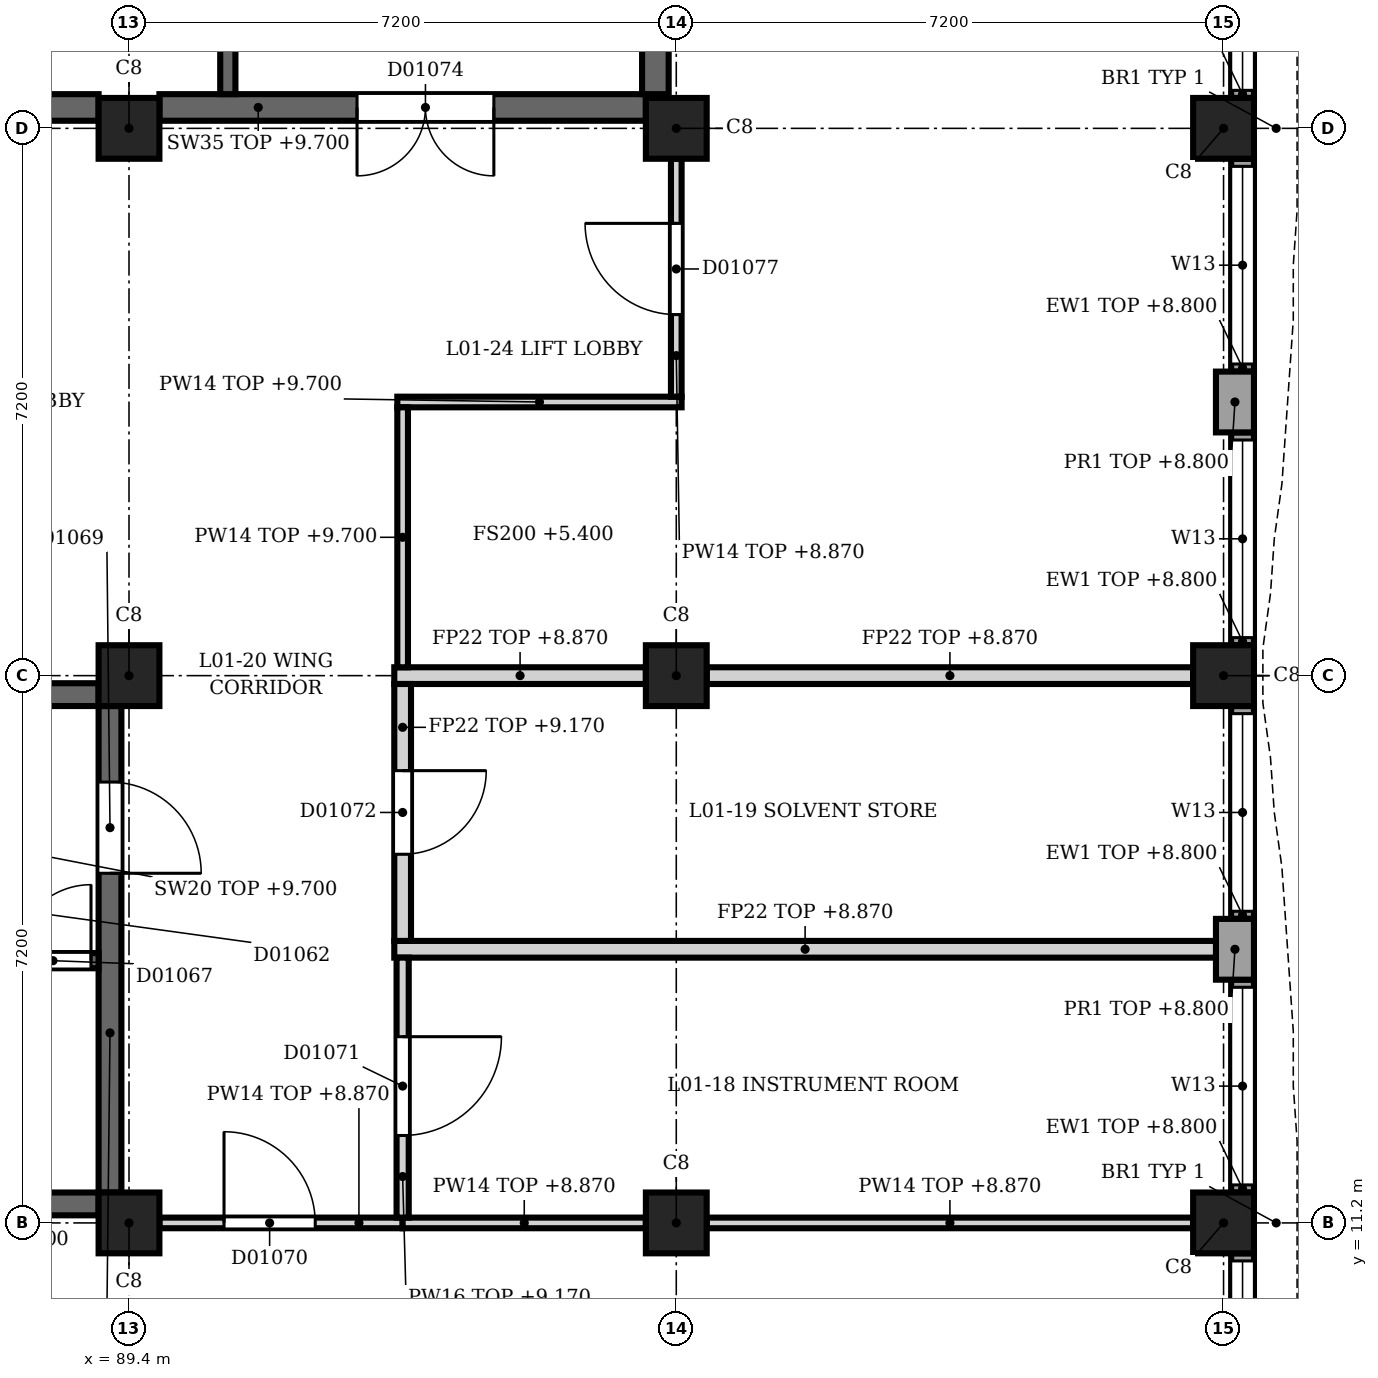
"""IFC4 building model, lengths in metres.
Left out: names, types, materials, properties, quantities, classifications, styles, units other than length and angle.
Written with IfcOpenShell. Run it as: python <this file> out.ifc"""

import sys

from ifc_helpers import new_model, si_unit, direction, frame, frame_2d, origin, origin_2d, place, context, subcontext, project, spatial, rectangle, extrude, element, fill, save


model = new_model("IFC4")
c1 = context("Model", 3, precision=1e-05, world=origin(), true_north=direction((0.0, 1.0)))
c2 = subcontext(c1, "Body", "Model", "MODEL_VIEW")
j1 = project(units=[si_unit("LENGTHUNIT", "METRE"), si_unit("PLANEANGLEUNIT", "RADIAN")], contexts=[c1])
p1 = place(None, origin())
s1 = spatial("IfcSite", under=j1, at=p1, CompositionType="ELEMENT")
p2 = place(p1, origin())
s2 = spatial("IfcBuilding", under=s1, at=p2, CompositionType="ELEMENT")
p3 = place(p2, frame((0.0, 0.0, 5.4)))
s3 = spatial("IfcBuildingStorey", under=s2, at=p3, CompositionType="ELEMENT", Elevation=5.4)
for number, where, z_axis, x_axis in (
    (1, (89.4, 11.2, 0.0), (0.0, 0.0, 1.0), (1.0, 0.0, 0.0)),
    (2, (89.4, 18.4, 0.0), (0.0, 0.0, 1.0), (1.0, 0.0, 0.0)),
    (3, (89.4, 25.6, 0.0), (0.0, 0.0, 1.0), (1.0, 0.0, 0.0)),
    (4, (96.6, 11.2, 0.0), (0.0, 0.0, 1.0), (1.0, 0.0, 0.0)),
    (5, (96.6, 18.4, 0.0), (0.0, 0.0, 1.0), (1.0, 0.0, 0.0)),
    (6, (96.6, 25.6, 0.0), (0.0, 0.0, 1.0), (1.0, 0.0, 0.0)),
    (7, (103.8, 11.2, 0.0), (0.0, 0.0, 1.0), (1.0, 0.0, 0.0)),
    (8, (103.8, 18.4, 0.0), (0.0, 0.0, 1.0), (1.0, 0.0, 0.0)),
    (9, (103.8, 25.6, 0.0), (0.0, 0.0, 1.0), (1.0, 0.0, 0.0)),
):
    element("IfcColumn", number, at=place(p3, frame(where, z_axis=z_axis, x_axis=x_axis)), inside=s3, PredefinedType="COLUMN", context=c2, shape_type="SweptSolid", body=[
        extrude(rectangle(XDim=0.8, YDim=0.8, at=origin_2d()), origin(), (0.0, 0.0, 1.0), 4.5),
    ])
p4 = place(p3, frame((103.95, 22.4, 0.0), z_axis=(0.0, 0.0, 1.0), x_axis=(0.0, -1.0, 0.0)))
e10 = element("IfcWall", 10, at=p4, inside=s3, PredefinedType="SOLIDWALL", context=c2, shape_type="SweptSolid", body=[
    extrude(rectangle(XDim=0.8, YDim=0.5, at=frame_2d((0.4, 0.0))), origin(), (0.0, 0.0, 1.0), 3.4),
])
p5 = place(p3, frame((103.95, 15.2, 0.0), z_axis=(0.0, 0.0, 1.0), x_axis=(0.0, -1.0, 0.0)))
e11 = element("IfcWall", 11, at=p5, inside=s3, PredefinedType="SOLIDWALL", context=c2, shape_type="SweptSolid", body=[
    extrude(rectangle(XDim=0.8, YDim=0.5, at=frame_2d((0.4, 0.0))), origin(), (0.0, 0.0, 1.0), 3.4),
])
p6 = place(p3, frame((104.05, 28.8, 0.0), z_axis=(0.0, 0.0, 1.0), x_axis=(0.0, -1.0, 0.0)))
e12 = element("IfcWall", 12, at=p6, inside=s3, PredefinedType="SOLIDWALL", context=c2, shape_type="SweptSolid", body=[
    extrude(rectangle(XDim=2.8, YDim=0.3, at=frame_2d((1.4, 0.0))), origin(), (0.0, 0.0, 1.0), 3.4),
])
p7 = place(p6, frame((0.1, 0.0, 0.9)))
e13 = element("IfcOpeningElement", 13, at=p7, cuts=e12, PredefinedType="OPENING", context=c2, shape_type="SweptSolid", body=[
    extrude(rectangle(XDim=2.6, YDim=2.2, at=frame_2d((1.3, 1.1))), frame((0.0, 0.16, 0.0), z_axis=(0.0, -1.0, 0.0), x_axis=(1.0, 0.0, 0.0)), (0.0, 0.0, 1.0), 0.32),
])
p8 = place(p3, frame((104.05, 25.2, 0.0), z_axis=(0.0, 0.0, 1.0), x_axis=(0.0, -1.0, 0.0)))
e14 = element("IfcWall", 14, at=p8, inside=s3, PredefinedType="SOLIDWALL", context=c2, shape_type="SweptSolid", body=[
    extrude(rectangle(XDim=2.8, YDim=0.3, at=frame_2d((1.4, 0.0))), origin(), (0.0, 0.0, 1.0), 3.4),
])
p9 = place(p8, frame((0.1, 0.0, 0.9)))
e15 = element("IfcOpeningElement", 15, at=p9, cuts=e14, PredefinedType="OPENING", context=c2, shape_type="SweptSolid", body=[
    extrude(rectangle(XDim=2.6, YDim=2.2, at=frame_2d((1.3, 1.1))), frame((0.0, 0.16, 0.0), z_axis=(0.0, -1.0, 0.0), x_axis=(1.0, 0.0, 0.0)), (0.0, 0.0, 1.0), 0.32),
])
p10 = place(p3, frame((104.05, 21.6, 0.0), z_axis=(0.0, 0.0, 1.0), x_axis=(0.0, -1.0, 0.0)))
e16 = element("IfcWall", 16, at=p10, inside=s3, PredefinedType="SOLIDWALL", context=c2, shape_type="SweptSolid", body=[
    extrude(rectangle(XDim=2.8, YDim=0.3, at=frame_2d((1.4, 0.0))), origin(), (0.0, 0.0, 1.0), 3.4),
])
p11 = place(p10, frame((0.1, 0.0, 0.9)))
e17 = element("IfcOpeningElement", 17, at=p11, cuts=e16, PredefinedType="OPENING", context=c2, shape_type="SweptSolid", body=[
    extrude(rectangle(XDim=2.6, YDim=2.2, at=frame_2d((1.3, 1.1))), frame((0.0, 0.16, 0.0), z_axis=(0.0, -1.0, 0.0), x_axis=(1.0, 0.0, 0.0)), (0.0, 0.0, 1.0), 0.32),
])
p12 = place(p3, frame((104.05, 18.0, 0.0), z_axis=(0.0, 0.0, 1.0), x_axis=(0.0, -1.0, 0.0)))
e18 = element("IfcWall", 18, at=p12, inside=s3, PredefinedType="SOLIDWALL", context=c2, shape_type="SweptSolid", body=[
    extrude(rectangle(XDim=2.8, YDim=0.3, at=frame_2d((1.4, 0.0))), origin(), (0.0, 0.0, 1.0), 3.4),
])
p13 = place(p12, frame((0.1, 0.0, 0.9)))
e19 = element("IfcOpeningElement", 19, at=p13, cuts=e18, PredefinedType="OPENING", context=c2, shape_type="SweptSolid", body=[
    extrude(rectangle(XDim=2.6, YDim=2.2, at=frame_2d((1.3, 1.1))), frame((0.0, 0.16, 0.0), z_axis=(0.0, -1.0, 0.0), x_axis=(1.0, 0.0, 0.0)), (0.0, 0.0, 1.0), 0.32),
])
p14 = place(p3, frame((104.05, 14.4, 0.0), z_axis=(0.0, 0.0, 1.0), x_axis=(0.0, -1.0, 0.0)))
e20 = element("IfcWall", 20, at=p14, inside=s3, PredefinedType="SOLIDWALL", context=c2, shape_type="SweptSolid", body=[
    extrude(rectangle(XDim=2.8, YDim=0.3, at=frame_2d((1.4, 0.0))), origin(), (0.0, 0.0, 1.0), 3.4),
])
p15 = place(p14, frame((0.1, 0.0, 0.9)))
e21 = element("IfcOpeningElement", 21, at=p15, cuts=e20, PredefinedType="OPENING", context=c2, shape_type="SweptSolid", body=[
    extrude(rectangle(XDim=2.6, YDim=2.2, at=frame_2d((1.3, 1.1))), frame((0.0, 0.16, 0.0), z_axis=(0.0, -1.0, 0.0), x_axis=(1.0, 0.0, 0.0)), (0.0, 0.0, 1.0), 0.32),
])
p16 = place(p3, frame((104.05, 10.8, 0.0), z_axis=(0.0, 0.0, 1.0), x_axis=(0.0, -1.0, 0.0)))
e22 = element("IfcWall", 22, at=p16, inside=s3, PredefinedType="SOLIDWALL", context=c2, shape_type="SweptSolid", body=[
    extrude(rectangle(XDim=2.8, YDim=0.3, at=frame_2d((1.4, 0.0))), origin(), (0.0, 0.0, 1.0), 3.4),
])
p17 = place(p16, frame((0.1, 0.0, 0.9)))
e23 = element("IfcOpeningElement", 23, at=p17, cuts=e22, PredefinedType="OPENING", context=c2, shape_type="SweptSolid", body=[
    extrude(rectangle(XDim=2.6, YDim=2.2, at=frame_2d((1.3, 1.1))), frame((0.0, 0.16, 0.0), z_axis=(0.0, -1.0, 0.0), x_axis=(1.0, 0.0, 0.0)), (0.0, 0.0, 1.0), 0.32),
])
p18 = place(p3, frame((82.6, 25.875, 0.0), z_axis=(0.0, 0.0, 1.0), x_axis=(1.0, 0.0, 0.0)))
e24 = element("IfcWall", 24, at=p18, inside=s3, PredefinedType="SHEAR", context=c2, shape_type="SweptSolid", body=[
    extrude(rectangle(XDim=6.4, YDim=0.35, at=frame_2d((3.2, 0.0))), origin(), (0.0, 0.0, 1.0), 4.3),
])
p19 = place(p18, frame((3.8, 0.0, 0.0)))
e25 = element("IfcOpeningElement", 25, at=p19, cuts=e24, PredefinedType="OPENING", context=c2, shape_type="SweptSolid", body=[
    extrude(rectangle(XDim=1.2, YDim=2.1, at=frame_2d((0.6, 1.05))), frame((0.0, 0.185, 0.0), z_axis=(0.0, -1.0, 0.0), x_axis=(1.0, 0.0, 0.0)), (0.0, 0.0, 1.0), 0.37),
])
p20 = place(p3, frame((89.8, 25.875, 0.0), z_axis=(0.0, 0.0, 1.0), x_axis=(1.0, 0.0, 0.0)))
e26 = element("IfcWall", 26, at=p20, inside=s3, PredefinedType="SHEAR", context=c2, shape_type="SweptSolid", body=[
    extrude(rectangle(XDim=6.4, YDim=0.35, at=frame_2d((3.2, 0.0))), origin(), (0.0, 0.0, 1.0), 4.3),
])
p21 = place(p20, frame((2.6, 0.0, 0.0)))
e27 = element("IfcOpeningElement", 27, at=p21, cuts=e26, PredefinedType="OPENING", context=c2, shape_type="SweptSolid", body=[
    extrude(rectangle(XDim=1.8, YDim=2.1, at=frame_2d((0.9, 1.05))), frame((0.0, 0.185, 0.0), z_axis=(0.0, -1.0, 0.0), x_axis=(1.0, 0.0, 0.0)), (0.0, 0.0, 1.0), 0.37),
])
p22 = place(p3, frame((96.325, 26.05, 0.0), z_axis=(0.0, 0.0, 1.0), x_axis=(0.0, 1.0, 0.0)))
e28 = element("IfcWall", 28, at=p22, inside=s3, PredefinedType="SHEAR", context=c2, shape_type="SweptSolid", body=[
    extrude(rectangle(XDim=6.3, YDim=0.35, at=frame_2d((3.15, 0.0))), origin(), (0.0, 0.0, 1.0), 4.3),
])
p23 = place(p3, frame((90.7, 26.05, 0.0), z_axis=(0.0, 0.0, 1.0), x_axis=(0.0, 1.0, 0.0)))
e29 = element("IfcWall", 29, at=p23, inside=s3, PredefinedType="SHEAR", context=c2, shape_type="SweptSolid", body=[
    extrude(rectangle(XDim=3.05, YDim=0.2, at=frame_2d((1.525, 0.0))), origin(), (0.0, 0.0, 1.0), 4.3),
])
p24 = place(p3, frame((89.15, 11.6, 0.0), z_axis=(0.0, 0.0, 1.0), x_axis=(0.0, 1.0, 0.0)))
e30 = element("IfcWall", 30, at=p24, inside=s3, PredefinedType="SHEAR", context=c2, shape_type="SweptSolid", body=[
    extrude(rectangle(XDim=6.4, YDim=0.3, at=frame_2d((3.2, 0.0))), origin(), (0.0, 0.0, 1.0), 4.3),
])
p25 = place(p24, frame((4.2, 0.0, 0.0)))
e31 = element("IfcOpeningElement", 31, at=p25, cuts=e30, PredefinedType="OPENING", context=c2, shape_type="SweptSolid", body=[
    extrude(rectangle(XDim=1.2, YDim=2.1, at=frame_2d((0.6, 1.05))), frame((0.0, 0.16, 0.0), z_axis=(0.0, -1.0, 0.0), x_axis=(1.0, 0.0, 0.0)), (0.0, 0.0, 1.0), 0.32),
])
for number, where, z_axis, x_axis in (
    (32, (82.6, 11.45, 0.0), (0.0, 0.0, 1.0), (1.0, 0.0, 0.0)),
    (33, (82.6, 18.15, 0.0), (0.0, 0.0, 1.0), (1.0, 0.0, 0.0)),
):
    element("IfcWall", number, at=place(p3, frame(where, z_axis=z_axis, x_axis=x_axis)), inside=s3, PredefinedType="SHEAR", context=c2, shape_type="SweptSolid", body=[
        extrude(rectangle(XDim=6.4, YDim=0.3, at=frame_2d((3.2, 0.0))), origin(), (0.0, 0.0, 1.0), 4.3),
    ])
p26 = place(p3, frame((89.0, 14.65, 0.0), z_axis=(0.0, 0.0, 1.0), x_axis=(-1.0, 0.0, 0.0)))
e34 = element("IfcWall", 34, at=p26, inside=s3, PredefinedType="SHEAR", context=c2, shape_type="SweptSolid", body=[
    extrude(rectangle(XDim=6.4, YDim=0.2, at=frame_2d((3.2, 0.0))), origin(), (0.0, 0.0, 1.0), 4.3),
])
p27 = place(p26, frame((0.1, 0.0, 0.0)))
e35 = element("IfcOpeningElement", 35, at=p27, cuts=e34, PredefinedType="OPENING", context=c2, shape_type="SweptSolid", body=[
    extrude(rectangle(XDim=1.0, YDim=2.1, at=frame_2d((0.5, 1.05))), frame((0.0, 0.11, 0.0), z_axis=(0.0, -1.0, 0.0), x_axis=(1.0, 0.0, 0.0)), (0.0, 0.0, 1.0), 0.22),
])
p28 = place(p3, frame((93.0, 11.2, 0.0), z_axis=(0.0, 0.0, 1.0), x_axis=(-1.0, 0.0, 0.0)))
e36 = element("IfcWall", 36, at=p28, inside=s3, PredefinedType="PARTITIONING", context=c2, shape_type="SweptSolid", body=[
    extrude(rectangle(XDim=3.2, YDim=0.14, at=frame_2d((1.6, 0.0))), origin(), (0.0, 0.0, 1.0), 3.47),
])
p29 = place(p28, frame((1.15, 0.0, 0.0)))
e37 = element("IfcOpeningElement", 37, at=p29, cuts=e36, PredefinedType="OPENING", context=c2, shape_type="SweptSolid", body=[
    extrude(rectangle(XDim=1.2, YDim=2.1, at=frame_2d((0.6, 1.05))), frame((0.0, 0.08, 0.0), z_axis=(0.0, -1.0, 0.0), x_axis=(1.0, 0.0, 0.0)), (0.0, 0.0, 1.0), 0.16),
])
p30 = place(p3, frame((93.0, 11.2, 0.0), z_axis=(0.0, 0.0, 1.0), x_axis=(1.0, 0.0, 0.0)))
e38 = element("IfcWall", 38, at=p30, inside=s3, PredefinedType="PARTITIONING", context=c2, shape_type="SweptSolid", body=[
    extrude(rectangle(XDim=3.2, YDim=0.14, at=frame_2d((1.6, 0.0))), origin(), (0.0, 0.0, 1.0), 3.47),
])
p31 = place(p3, frame((97.0, 11.2, 0.0), z_axis=(0.0, 0.0, 1.0), x_axis=(1.0, 0.0, 0.0)))
e39 = element("IfcWall", 39, at=p31, inside=s3, PredefinedType="PARTITIONING", context=c2, shape_type="SweptSolid", body=[
    extrude(rectangle(XDim=6.4, YDim=0.14, at=frame_2d((3.2, 0.0))), origin(), (0.0, 0.0, 1.0), 3.47),
])
p32 = place(p3, frame((92.89, 14.8, 0.0), z_axis=(0.0, 0.0, 1.0), x_axis=(1.0, 0.0, 0.0)))
e40 = element("IfcWall", 40, at=p32, inside=s3, PredefinedType="PARTITIONING", context=c2, shape_type="SweptSolid", body=[
    extrude(rectangle(XDim=10.81, YDim=0.22, at=frame_2d((5.405, 0.0))), origin(), (0.0, 0.0, 1.0), 3.47),
])
p33 = place(p3, frame((92.89, 18.4, 0.0), z_axis=(0.0, 0.0, 1.0), x_axis=(1.0, 0.0, 0.0)))
e41 = element("IfcWall", 41, at=p33, inside=s3, PredefinedType="PARTITIONING", context=c2, shape_type="SweptSolid", body=[
    extrude(rectangle(XDim=3.31, YDim=0.22, at=frame_2d((1.655, 0.0))), origin(), (0.0, 0.0, 1.0), 3.47),
])
p34 = place(p3, frame((97.0, 18.4, 0.0), z_axis=(0.0, 0.0, 1.0), x_axis=(1.0, 0.0, 0.0)))
e42 = element("IfcWall", 42, at=p34, inside=s3, PredefinedType="PARTITIONING", context=c2, shape_type="SweptSolid", body=[
    extrude(rectangle(XDim=6.4, YDim=0.22, at=frame_2d((3.2, 0.0))), origin(), (0.0, 0.0, 1.0), 3.47),
])
p35 = place(p3, frame((92.93, 22.0, 0.0), z_axis=(0.0, 0.0, 1.0), x_axis=(1.0, 0.0, 0.0)))
e43 = element("IfcWall", 43, at=p35, inside=s3, PredefinedType="PARTITIONING", context=c2, shape_type="SweptSolid", body=[
    extrude(rectangle(XDim=3.74, YDim=0.14, at=frame_2d((1.87, 0.0))), origin(), (0.0, 0.0, 1.0), 4.3),
])
p36 = place(p3, frame((93.0, 14.69, 0.0), z_axis=(0.0, 0.0, 1.0), x_axis=(0.0, -1.0, 0.0)))
e44 = element("IfcWall", 44, at=p36, inside=s3, PredefinedType="PARTITIONING", context=c2, shape_type="SweptSolid", body=[
    extrude(rectangle(XDim=3.42, YDim=0.16, at=frame_2d((1.71, 0.0))), origin(), (0.0, 0.0, 1.0), 3.77),
])
p37 = place(p36, frame((1.04, 0.0, 0.0)))
e45 = element("IfcOpeningElement", 45, at=p37, cuts=e44, PredefinedType="OPENING", context=c2, shape_type="SweptSolid", body=[
    extrude(rectangle(XDim=1.3, YDim=2.2, at=frame_2d((0.65, 1.1))), frame((0.0, 0.09, 0.0), z_axis=(0.0, -1.0, 0.0), x_axis=(1.0, 0.0, 0.0)), (0.0, 0.0, 1.0), 0.18),
])
p38 = place(p3, frame((93.0, 18.29, 0.0), z_axis=(0.0, 0.0, 1.0), x_axis=(0.0, -1.0, 0.0)))
e46 = element("IfcWall", 46, at=p38, inside=s3, PredefinedType="PARTITIONING", context=c2, shape_type="SweptSolid", body=[
    extrude(rectangle(XDim=3.38, YDim=0.22, at=frame_2d((1.69, 0.0))), origin(), (0.0, 0.0, 1.0), 3.77),
])
p39 = place(p38, frame((1.14, 0.0, 0.0)))
e47 = element("IfcOpeningElement", 47, at=p39, cuts=e46, PredefinedType="OPENING", context=c2, shape_type="SweptSolid", body=[
    extrude(rectangle(XDim=1.1, YDim=2.3, at=frame_2d((0.55, 1.15))), frame((0.0, 0.12, 0.0), z_axis=(0.0, -1.0, 0.0), x_axis=(1.0, 0.0, 0.0)), (0.0, 0.0, 1.0), 0.24),
])
p40 = place(p3, frame((93.0, 18.51, 0.0), z_axis=(0.0, 0.0, 1.0), x_axis=(0.0, 1.0, 0.0)))
e48 = element("IfcWall", 48, at=p40, inside=s3, PredefinedType="PARTITIONING", context=c2, shape_type="SweptSolid", body=[
    extrude(rectangle(XDim=3.42, YDim=0.14, at=frame_2d((1.71, 0.0))), origin(), (0.0, 0.0, 1.0), 4.3),
])
p41 = place(p3, frame((96.6, 25.2, 0.0), z_axis=(0.0, 0.0, 1.0), x_axis=(0.0, -1.0, 0.0)))
e49 = element("IfcWall", 49, at=p41, inside=s3, PredefinedType="PARTITIONING", context=c2, shape_type="SweptSolid", body=[
    extrude(rectangle(XDim=3.13, YDim=0.14, at=frame_2d((1.565, 0.0))), origin(), (0.0, 0.0, 1.0), 3.47),
])
p42 = place(p41, frame((0.85, 0.0, 0.0)))
e50 = element("IfcOpeningElement", 50, at=p42, cuts=e49, PredefinedType="OPENING", context=c2, shape_type="SweptSolid", body=[
    extrude(rectangle(XDim=1.2, YDim=2.1, at=frame_2d((0.6, 1.05))), frame((0.0, 0.08, 0.0), z_axis=(0.0, -1.0, 0.0), x_axis=(1.0, 0.0, 0.0)), (0.0, 0.0, 1.0), 0.16),
])
p43 = place(p7, origin())
e51 = element("IfcWindow", 51, at=p43, inside=s3, PartitioningType="SINGLE_PANEL", PredefinedType="WINDOW", context=c2, shape_type="SweptSolid", body=[
    extrude(rectangle(XDim=2.6, YDim=2.2, at=frame_2d((1.3, 1.1))), frame((0.0, 0.03, 0.0), z_axis=(0.0, -1.0, 0.0), x_axis=(1.0, 0.0, 0.0)), (0.0, 0.0, 1.0), 0.06),
])
fill(e13, e51)
p44 = place(p9, origin())
e52 = element("IfcWindow", 52, at=p44, inside=s3, PartitioningType="SINGLE_PANEL", PredefinedType="WINDOW", context=c2, shape_type="SweptSolid", body=[
    extrude(rectangle(XDim=2.6, YDim=2.2, at=frame_2d((1.3, 1.1))), frame((0.0, 0.03, 0.0), z_axis=(0.0, -1.0, 0.0), x_axis=(1.0, 0.0, 0.0)), (0.0, 0.0, 1.0), 0.06),
])
fill(e15, e52)
p45 = place(p11, origin())
e53 = element("IfcWindow", 53, at=p45, inside=s3, PartitioningType="SINGLE_PANEL", PredefinedType="WINDOW", context=c2, shape_type="SweptSolid", body=[
    extrude(rectangle(XDim=2.6, YDim=2.2, at=frame_2d((1.3, 1.1))), frame((0.0, 0.03, 0.0), z_axis=(0.0, -1.0, 0.0), x_axis=(1.0, 0.0, 0.0)), (0.0, 0.0, 1.0), 0.06),
])
fill(e17, e53)
p46 = place(p13, origin())
e54 = element("IfcWindow", 54, at=p46, inside=s3, PartitioningType="SINGLE_PANEL", PredefinedType="WINDOW", context=c2, shape_type="SweptSolid", body=[
    extrude(rectangle(XDim=2.6, YDim=2.2, at=frame_2d((1.3, 1.1))), frame((0.0, 0.03, 0.0), z_axis=(0.0, -1.0, 0.0), x_axis=(1.0, 0.0, 0.0)), (0.0, 0.0, 1.0), 0.06),
])
fill(e19, e54)
p47 = place(p15, origin())
e55 = element("IfcWindow", 55, at=p47, inside=s3, PartitioningType="SINGLE_PANEL", PredefinedType="WINDOW", context=c2, shape_type="SweptSolid", body=[
    extrude(rectangle(XDim=2.6, YDim=2.2, at=frame_2d((1.3, 1.1))), frame((0.0, 0.03, 0.0), z_axis=(0.0, -1.0, 0.0), x_axis=(1.0, 0.0, 0.0)), (0.0, 0.0, 1.0), 0.06),
])
fill(e21, e55)
p48 = place(p17, origin())
e56 = element("IfcWindow", 56, at=p48, inside=s3, PartitioningType="SINGLE_PANEL", PredefinedType="WINDOW", context=c2, shape_type="SweptSolid", body=[
    extrude(rectangle(XDim=2.6, YDim=2.2, at=frame_2d((1.3, 1.1))), frame((0.0, 0.03, 0.0), z_axis=(0.0, -1.0, 0.0), x_axis=(1.0, 0.0, 0.0)), (0.0, 0.0, 1.0), 0.06),
])
fill(e23, e56)
p49 = place(p21, origin())
e57 = element("IfcDoor", 57, at=p49, inside=s3, OperationType="SINGLE_SWING_LEFT", PredefinedType="DOOR", context=c2, shape_type="SweptSolid", body=[
    extrude(rectangle(XDim=1.8, YDim=2.1, at=frame_2d((0.9, 1.05))), frame((0.0, 0.025, 0.0), z_axis=(0.0, -1.0, 0.0), x_axis=(1.0, 0.0, 0.0)), (0.0, 0.0, 1.0), 0.05),
])
fill(e27, e57)
p50 = place(p25, origin())
e58 = element("IfcDoor", 58, at=p50, inside=s3, OperationType="SINGLE_SWING_RIGHT", PredefinedType="DOOR", context=c2, shape_type="SweptSolid", body=[
    extrude(rectangle(XDim=1.2, YDim=2.1, at=frame_2d((0.6, 1.05))), frame((0.0, 0.025, 0.0), z_axis=(0.0, -1.0, 0.0), x_axis=(1.0, 0.0, 0.0)), (0.0, 0.0, 1.0), 0.05),
])
fill(e31, e58)
p51 = place(p27, origin())
e59 = element("IfcDoor", 59, at=p51, inside=s3, OperationType="SINGLE_SWING_LEFT", PredefinedType="DOOR", context=c2, shape_type="SweptSolid", body=[
    extrude(rectangle(XDim=1.0, YDim=2.1, at=frame_2d((0.5, 1.05))), frame((0.0, 0.025, 0.0), z_axis=(0.0, -1.0, 0.0), x_axis=(1.0, 0.0, 0.0)), (0.0, 0.0, 1.0), 0.05),
])
fill(e35, e59)
p52 = place(p29, origin())
e60 = element("IfcDoor", 60, at=p52, inside=s3, OperationType="SINGLE_SWING_RIGHT", PredefinedType="DOOR", context=c2, shape_type="SweptSolid", body=[
    extrude(rectangle(XDim=1.2, YDim=2.1, at=frame_2d((0.6, 1.05))), frame((0.0, 0.025, 0.0), z_axis=(0.0, -1.0, 0.0), x_axis=(1.0, 0.0, 0.0)), (0.0, 0.0, 1.0), 0.05),
])
fill(e37, e60)
p53 = place(p37, origin())
e61 = element("IfcDoor", 61, at=p53, inside=s3, OperationType="SINGLE_SWING_LEFT", PredefinedType="DOOR", context=c2, shape_type="SweptSolid", body=[
    extrude(rectangle(XDim=1.3, YDim=2.2, at=frame_2d((0.65, 1.1))), frame((0.0, 0.025, 0.0), z_axis=(0.0, -1.0, 0.0), x_axis=(1.0, 0.0, 0.0)), (0.0, 0.0, 1.0), 0.05),
])
fill(e45, e61)
p54 = place(p39, origin())
e62 = element("IfcDoor", 62, at=p54, inside=s3, OperationType="SINGLE_SWING_LEFT", PredefinedType="DOOR", context=c2, shape_type="SweptSolid", body=[
    extrude(rectangle(XDim=1.1, YDim=2.3, at=frame_2d((0.55, 1.15))), frame((0.0, 0.025, 0.0), z_axis=(0.0, -1.0, 0.0), x_axis=(1.0, 0.0, 0.0)), (0.0, 0.0, 1.0), 0.05),
])
fill(e47, e62)
p55 = place(p42, origin())
e63 = element("IfcDoor", 63, at=p55, inside=s3, OperationType="SINGLE_SWING_LEFT", PredefinedType="DOOR", context=c2, shape_type="SweptSolid", body=[
    extrude(rectangle(XDim=1.2, YDim=2.1, at=frame_2d((0.6, 1.05))), frame((0.0, 0.025, 0.0), z_axis=(0.0, -1.0, 0.0), x_axis=(1.0, 0.0, 0.0)), (0.0, 0.0, 1.0), 0.05),
])
fill(e50, e63)
save(model, sys.argv[1])
